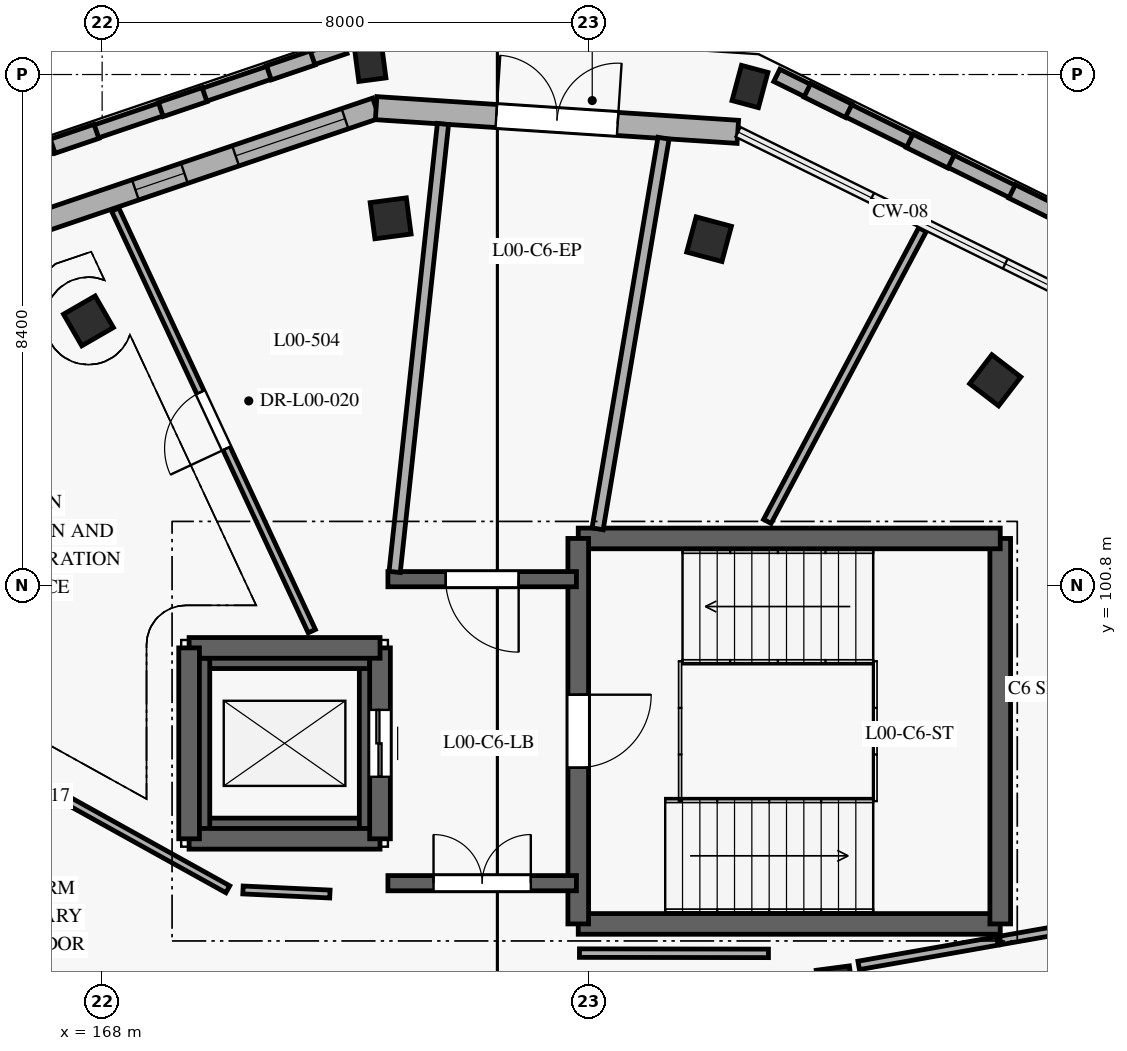
"""IFC4 building model, lengths in metres.
Left out: names, types, materials, properties, quantities, classifications, styles, units other than length and angle.
Written with IfcOpenShell. Run it as: python <this file> out.ifc"""

import sys

from ifc_helpers import new_model, si_unit, direction, frame, frame_2d, origin, origin_2d, place, context, subcontext, project, spatial, rectangle, extrude, element, fill, save


model = new_model("IFC4")
c1 = context("Model", 3, precision=1e-05, world=origin(), true_north=direction((0.0, 1.0)))
c2 = subcontext(c1, "Body", "Model", "MODEL_VIEW")
j1 = project(units=[si_unit("LENGTHUNIT", "METRE"), si_unit("PLANEANGLEUNIT", "RADIAN")], contexts=[c1])
p1 = place(None, origin())
s1 = spatial("IfcSite", under=j1, at=p1, CompositionType="ELEMENT")
p2 = place(p1, origin())
s2 = spatial("IfcBuilding", under=s1, at=p2, CompositionType="ELEMENT")
p3 = place(p2, origin())
s3 = spatial("IfcBuildingStorey", under=s2, at=p3, CompositionType="ELEMENT", Elevation=0.0)
for number, where, z_axis, x_axis in (
    (1, (178.654, 109.003, 0.0), (0.0, 0.0, 1.0), (-0.966, 0.259, 0.0)),
    (2, (172.405, 109.413, 0.0), (0.0, 0.0, 1.0), (-0.991, -0.131, 0.0)),
):
    element("IfcColumn", number, at=place(p3, frame(where, z_axis=z_axis, x_axis=x_axis)), inside=s3, PredefinedType="PILASTER", context=c2, shape_type="SweptSolid", body=[
        extrude(rectangle(XDim=0.45, YDim=0.6, at=origin_2d()), origin(), (0.0, 0.0, 1.0), 4.2),
    ])
for number, where, z_axis, x_axis in (
    (3, (182.688, 104.171, 0.0), (0.0, 0.0, 1.0), (-0.793, 0.609, 0.0)),
    (4, (177.981, 106.492, 0.0), (0.0, 0.0, 1.0), (-0.966, 0.259, 0.0)),
    (5, (172.744, 106.835, 0.0), (0.0, 0.0, 1.0), (-0.991, -0.131, 0.0)),
    (6, (167.775, 105.148, 0.0), (0.0, 0.0, 1.0), (-0.866, -0.5, 0.0)),
):
    element("IfcColumn", number, at=place(p3, frame(where, z_axis=z_axis, x_axis=x_axis)), inside=s3, PredefinedType="COLUMN", context=c2, shape_type="SweptSolid", body=[
        extrude(rectangle(XDim=0.6, YDim=0.6, at=origin_2d()), origin(), (0.0, 0.0, 1.0), 4.2),
    ])
p4 = place(p3, frame((180.052, 94.231, 0.0), z_axis=(0.0, 0.0, 1.0), x_axis=(0.991444861374, 0.13052619222, 0.0)))
e7 = element("IfcColumn", 7, at=p4, inside=s3, PredefinedType="COLUMN", context=c2, shape_type="SweptSolid", body=[
    extrude(rectangle(XDim=0.55, YDim=0.55, at=origin_2d()), origin(), (0.0, 0.0, 1.0), 4.2),
])
p5 = place(p3, frame((166.861, 106.731, 0.0), z_axis=(0.0, 0.0, 1.0), x_axis=(0.94693663561, 0.321420298269, 0.0)))
e8 = element("IfcWall", 8, at=p5, inside=s3, PredefinedType="SOLIDWALL", context=c2, shape_type="SweptSolid", body=[
    extrude(rectangle(XDim=5.961, YDim=0.35, at=frame_2d((2.98, 0.0))), origin(), (0.0, 0.0, 1.0), 3.94),
])
p6 = place(p5, frame((1.781, 0.0, 0.85)))
e9 = element("IfcOpeningElement", 9, at=p6, cuts=e8, PredefinedType="OPENING", context=c2, shape_type="SweptSolid", body=[
    extrude(rectangle(XDim=0.85, YDim=1.4, at=frame_2d((0.425, 0.7))), frame((0.0, 0.185, 0.0), z_axis=(0.0, -1.0, 0.0), x_axis=(1.0, 0.0, 0.0)), (0.0, 0.0, 1.0), 0.37),
])
p7 = place(p5, frame((3.521, 0.0, 0.85)))
e10 = element("IfcOpeningElement", 10, at=p7, cuts=e8, PredefinedType="OPENING", context=c2, shape_type="SweptSolid", body=[
    extrude(rectangle(XDim=1.9, YDim=1.8, at=frame_2d((0.95, 0.9))), frame((0.0, 0.185, 0.0), z_axis=(0.0, -1.0, 0.0), x_axis=(1.0, 0.0, 0.0)), (0.0, 0.0, 1.0), 0.37),
])
p8 = place(p3, frame((172.506, 108.647, 0.0), z_axis=(0.0, 0.0, 1.0), x_axis=(0.997858658418, -0.065407169492, 0.0)))
e11 = element("IfcWall", 11, at=p8, inside=s3, PredefinedType="SOLIDWALL", context=c2, shape_type="SweptSolid", body=[
    extrude(rectangle(XDim=5.961, YDim=0.38, at=frame_2d((2.98, 0.0))), origin(), (0.0, 0.0, 1.0), 3.94),
])
p9 = place(p8, frame((1.98, 0.0, 0.0)))
e12 = element("IfcOpeningElement", 12, at=p9, cuts=e11, PredefinedType="OPENING", context=c2, shape_type="SweptSolid", body=[
    extrude(rectangle(XDim=2.0, YDim=2.2, at=frame_2d((1.0, 1.1))), frame((0.0, 0.2, 0.0), z_axis=(0.0, -1.0, 0.0), x_axis=(1.0, 0.0, 0.0)), (0.0, 0.0, 1.0), 0.4),
])
p10 = place(p3, frame((184.147, 106.695, 0.0), z_axis=(0.0, 0.0, 1.0), x_axis=(-0.896858387366, 0.442317796398, 0.0)))
e13 = element("IfcWall", 13, at=p10, inside=s3, PredefinedType="ELEMENTEDWALL", context=c2, shape_type="SweptSolid", body=[
    extrude(rectangle(XDim=5.633, YDim=0.225, at=frame_2d((2.816, 0.0))), origin(), (0.0, 0.0, 1.0), 0.55),
])
for number, where, z_axis, x_axis in (
    (14, (183.646, 106.942, 0.55), (0.0, 0.0, 1.0), (-0.897, 0.442, 0.0)),
    (15, (181.962, 107.772, 0.55), (0.0, 0.0, 1.0), (-0.897, 0.442, 0.0)),
    (16, (180.278, 108.603, 0.55), (0.0, 0.0, 1.0), (-0.897, 0.442, 0.0)),
):
    element("IfcWall", number, at=place(p3, frame(where, z_axis=z_axis, x_axis=x_axis)), inside=s3, PredefinedType="ELEMENTEDWALL", context=c2, shape_type="SweptSolid", body=[
        extrude(rectangle(XDim=0.76, YDim=0.245, at=frame_2d((0.38, 0.0))), origin(), (0.0, 0.0, 1.0), 3.39),
    ])
p11 = place(p3, frame((171.991, 109.652, 0.0), z_axis=(0.0, 0.0, 1.0), x_axis=(-0.946926405411, -0.321450435893, 0.0)))
e17 = element("IfcWall", 17, at=p11, inside=s3, PredefinedType="ELEMENTEDWALL", context=c2, shape_type="SweptSolid", body=[
    extrude(rectangle(XDim=5.632, YDim=0.225, at=frame_2d((2.816, 0.0))), origin(), (0.0, 0.0, 1.0), 0.55),
])
for number, where, z_axis, x_axis in (
    (18, (171.462, 109.472, 0.55), (0.0, 0.0, 1.0), (-0.947, -0.322, 0.0)),
    (19, (169.684, 108.869, 0.55), (0.0, 0.0, 1.0), (-0.947, -0.321, 0.0)),
):
    element("IfcWall", number, at=place(p3, frame(where, z_axis=z_axis, x_axis=x_axis)), inside=s3, PredefinedType="ELEMENTEDWALL", context=c2, shape_type="SweptSolid", body=[
        extrude(rectangle(XDim=0.76, YDim=0.245, at=frame_2d((0.38, 0.0))), origin(), (0.0, 0.0, 1.0), 3.39),
    ])
p12 = place(p3, frame((167.906, 108.265, 0.55), z_axis=(0.0, 0.0, 1.0), x_axis=(-0.946868666253, -0.321620473335, 0.0)))
e20 = element("IfcWall", 20, at=p12, inside=s3, PredefinedType="ELEMENTEDWALL", context=c2, shape_type="SweptSolid", body=[
    extrude(rectangle(XDim=0.76, YDim=0.245, at=frame_2d((0.38, 0.0))), origin(), (0.0, 0.0, 1.0), 3.39),
])
p13 = place(p3, frame((169.6, 96.8, -1.4), z_axis=(0.0, 0.0, 1.0), x_axis=(1.0, 0.0, 0.0)))
e21 = element("IfcWall", 21, at=p13, inside=s3, PredefinedType="SHEAR", context=c2, shape_type="SweptSolid", body=[
    extrude(rectangle(XDim=2.8, YDim=0.34, at=frame_2d((1.4, 0.0))), origin(), (0.0, 0.0, 1.0), 1.4),
])
p14 = place(p3, frame((172.4, 96.8, -1.4), z_axis=(0.0, 0.0, 1.0), x_axis=(0.0, 1.0, 0.0)))
e22 = element("IfcWall", 22, at=p14, inside=s3, PredefinedType="SHEAR", context=c2, shape_type="SweptSolid", body=[
    extrude(rectangle(XDim=2.8, YDim=0.34, at=frame_2d((1.4, 0.0))), origin(), (0.0, 0.0, 1.0), 1.4),
])
p15 = place(p3, frame((172.4, 99.6, -1.4), z_axis=(0.0, 0.0, 1.0), x_axis=(-1.0, 0.0, 0.0)))
e23 = element("IfcWall", 23, at=p15, inside=s3, PredefinedType="SHEAR", context=c2, shape_type="SweptSolid", body=[
    extrude(rectangle(XDim=2.8, YDim=0.34, at=frame_2d((1.4, 0.0))), origin(), (0.0, 0.0, 1.0), 1.4),
])
p16 = place(p3, frame((169.6, 99.6, -1.4), z_axis=(0.0, 0.0, 1.0), x_axis=(0.0, -1.0, 0.0)))
e24 = element("IfcWall", 24, at=p16, inside=s3, PredefinedType="SHEAR", context=c2, shape_type="SweptSolid", body=[
    extrude(rectangle(XDim=2.8, YDim=0.34, at=frame_2d((1.4, 0.0))), origin(), (0.0, 0.0, 1.0), 1.4),
])
p17 = place(p3, frame((175.83, 95.23, 0.0), z_axis=(0.0, 0.0, 1.0), x_axis=(1.0, 0.0, 0.0)))
e25 = element("IfcWall", 25, at=p17, inside=s3, PredefinedType="SHEAR", context=c2, shape_type="SweptSolid", body=[
    extrude(rectangle(XDim=6.94, YDim=0.34, at=frame_2d((3.47, 0.0))), origin(), (0.0, 0.0, 1.0), 3.95),
])
p18 = place(p3, frame((182.77, 95.23, 0.0), z_axis=(0.0, 0.0, 1.0), x_axis=(0.0, 1.0, 0.0)))
e26 = element("IfcWall", 26, at=p18, inside=s3, PredefinedType="SHEAR", context=c2, shape_type="SweptSolid", body=[
    extrude(rectangle(XDim=6.34, YDim=0.34, at=frame_2d((3.17, 0.0))), origin(), (0.0, 0.0, 1.0), 3.95),
])
p19 = place(p3, frame((182.77, 101.57, 0.0), z_axis=(0.0, 0.0, 1.0), x_axis=(-1.0, 0.0, 0.0)))
e27 = element("IfcWall", 27, at=p19, inside=s3, PredefinedType="SHEAR", context=c2, shape_type="SweptSolid", body=[
    extrude(rectangle(XDim=6.94, YDim=0.34, at=frame_2d((3.47, 0.0))), origin(), (0.0, 0.0, 1.0), 3.95),
])
p20 = place(p3, frame((175.83, 101.57, 0.0), z_axis=(0.0, 0.0, 1.0), x_axis=(0.0, -1.0, 0.0)))
e28 = element("IfcWall", 28, at=p20, inside=s3, PredefinedType="SHEAR", context=c2, shape_type="SweptSolid", body=[
    extrude(rectangle(XDim=6.34, YDim=0.34, at=frame_2d((3.17, 0.0))), origin(), (0.0, 0.0, 1.0), 3.95),
])
p21 = place(p20, frame((2.57, 0.0, 0.0)))
e29 = element("IfcOpeningElement", 29, at=p21, cuts=e28, PredefinedType="OPENING", context=c2, shape_type="SweptSolid", body=[
    extrude(rectangle(XDim=1.2, YDim=2.1, at=frame_2d((0.6, 1.05))), frame((0.0, 0.18, 0.0), z_axis=(0.0, -1.0, 0.0), x_axis=(1.0, 0.0, 0.0)), (0.0, 0.0, 1.0), 0.36),
])
p22 = place(p3, frame((169.43, 96.63, 0.0), z_axis=(0.0, 0.0, 1.0), x_axis=(1.0, 0.0, 0.0)))
e30 = element("IfcWall", 30, at=p22, inside=s3, PredefinedType="SHEAR", context=c2, shape_type="SweptSolid", body=[
    extrude(rectangle(XDim=3.14, YDim=0.34, at=frame_2d((1.57, 0.0))), origin(), (0.0, 0.0, 1.0), 3.95),
])
p23 = place(p3, frame((172.57, 96.63, 0.0), z_axis=(0.0, 0.0, 1.0), x_axis=(0.0, 1.0, 0.0)))
e31 = element("IfcWall", 31, at=p23, inside=s3, PredefinedType="SHEAR", context=c2, shape_type="SweptSolid", body=[
    extrude(rectangle(XDim=3.14, YDim=0.34, at=frame_2d((1.57, 0.0))), origin(), (0.0, 0.0, 1.0), 3.95),
])
p24 = place(p23, frame((1.02, 0.0, 0.0)))
e32 = element("IfcOpeningElement", 32, at=p24, cuts=e31, PredefinedType="OPENING", context=c2, shape_type="SweptSolid", body=[
    extrude(rectangle(XDim=1.1, YDim=2.1, at=frame_2d((0.55, 1.05))), frame((0.0, 0.18, 0.0), z_axis=(0.0, -1.0, 0.0), x_axis=(1.0, 0.0, 0.0)), (0.0, 0.0, 1.0), 0.36),
])
for number, where, z_axis, x_axis in (
    (33, (172.57, 99.77, 0.0), (0.0, 0.0, 1.0), (-1.0, 0.0, 0.0)),
    (34, (169.43, 99.77, 0.0), (0.0, 0.0, 1.0), (0.0, -1.0, 0.0)),
):
    element("IfcWall", number, at=place(p3, frame(where, z_axis=z_axis, x_axis=x_axis)), inside=s3, PredefinedType="SHEAR", context=c2, shape_type="SweptSolid", body=[
        extrude(rectangle(XDim=3.14, YDim=0.34, at=frame_2d((1.57, 0.0))), origin(), (0.0, 0.0, 1.0), 3.95),
    ])
p25 = place(p3, frame((172.7, 95.9, 0.0), z_axis=(0.0, 0.0, 1.0), x_axis=(1.0, 0.0, 0.0)))
e35 = element("IfcWall", 35, at=p25, inside=s3, PredefinedType="SHEAR", context=c2, shape_type="SweptSolid", body=[
    extrude(rectangle(XDim=3.1, YDim=0.25, at=frame_2d((1.55, 0.0))), origin(), (0.0, 0.0, 1.0), 3.95),
])
p26 = place(p25, frame((0.75, 0.0, 0.0)))
e36 = element("IfcOpeningElement", 36, at=p26, cuts=e35, PredefinedType="OPENING", context=c2, shape_type="SweptSolid", body=[
    extrude(rectangle(XDim=1.6, YDim=2.15, at=frame_2d((0.8, 1.075))), frame((0.0, 0.135, 0.0), z_axis=(0.0, -1.0, 0.0), x_axis=(1.0, 0.0, 0.0)), (0.0, 0.0, 1.0), 0.27),
])
p27 = place(p3, frame((175.8, 100.9, 0.0), z_axis=(0.0, 0.0, 1.0), x_axis=(-1.0, 0.0, 0.0)))
e37 = element("IfcWall", 37, at=p27, inside=s3, PredefinedType="SHEAR", context=c2, shape_type="SweptSolid", body=[
    extrude(rectangle(XDim=3.1, YDim=0.25, at=frame_2d((1.55, 0.0))), origin(), (0.0, 0.0, 1.0), 3.95),
])
p28 = place(p27, frame((0.95, 0.0, 0.0)))
e38 = element("IfcOpeningElement", 38, at=p28, cuts=e37, PredefinedType="OPENING", context=c2, shape_type="SweptSolid", body=[
    extrude(rectangle(XDim=1.2, YDim=2.1, at=frame_2d((0.6, 1.05))), frame((0.0, 0.135, 0.0), z_axis=(0.0, -1.0, 0.0), x_axis=(1.0, 0.0, 0.0)), (0.0, 0.0, 1.0), 0.27),
])
p29 = place(p3, frame((176.148, 101.728, 0.0), z_axis=(0.0, 0.0, 1.0), x_axis=(0.166482807525, 0.986044357419, 0.0)))
e39 = element("IfcWall", 39, at=p29, inside=s3, PredefinedType="PARTITIONING", context=c2, shape_type="SweptSolid", body=[
    extrude(rectangle(XDim=6.515, YDim=0.185, at=frame_2d((3.258, 0.0))), origin(), (0.0, 0.0, 1.0), 3.915),
])
p30 = place(p3, frame((173.605, 108.386, 0.0), z_axis=(0.0, 0.0, 1.0), x_axis=(-0.107241554815, -0.994232995289, 0.0)))
e40 = element("IfcWall", 40, at=p30, inside=s3, PredefinedType="PARTITIONING", context=c2, shape_type="SweptSolid", body=[
    extrude(rectangle(XDim=7.41, YDim=0.185, at=frame_2d((3.705, 0.0))), origin(), (0.0, 0.0, 1.0), 3.915),
])
p31 = place(p3, frame((171.448, 100.045, 0.0), z_axis=(0.0, 0.0, 1.0), x_axis=(-0.422616424188, 0.906308643899, 0.0)))
e41 = element("IfcWall", 41, at=p31, inside=s3, PredefinedType="PARTITIONING", context=c2, shape_type="SweptSolid", body=[
    extrude(rectangle(XDim=7.651, YDim=0.13, at=frame_2d((3.825, 0.0))), origin(), (0.0, 0.0, 1.0), 3.915),
])
p32 = place(p31, frame((3.315, 0.0, 0.0)))
e42 = element("IfcOpeningElement", 42, at=p32, cuts=e41, PredefinedType="OPENING", context=c2, shape_type="SweptSolid", body=[
    extrude(rectangle(XDim=1.02, YDim=2.06, at=frame_2d((0.51, 1.03))), frame((0.0, 0.075, 0.0), z_axis=(0.0, -1.0, 0.0), x_axis=(1.0, 0.0, 0.0)), (0.0, 0.0, 1.0), 0.15),
])
p33 = place(p3, frame((162.087, 100.228, 0.0), z_axis=(0.0, 0.0, 1.0), x_axis=(0.874404504476, -0.485197653077, 0.0)))
e43 = element("IfcWall", 43, at=p33, inside=s3, PredefinedType="PARTITIONING", context=c2, shape_type="SweptSolid", body=[
    extrude(rectangle(XDim=9.126, YDim=0.13, at=frame_2d((4.563, 0.0))), origin(), (0.0, 0.0, 1.0), 3.915),
])
p34 = place(p33, frame((4.113, 0.0, 0.0)))
e44 = element("IfcOpeningElement", 44, at=p34, cuts=e43, PredefinedType="OPENING", context=c2, shape_type="SweptSolid", body=[
    extrude(rectangle(XDim=0.9, YDim=2.05, at=frame_2d((0.45, 1.025))), frame((0.0, 0.075, 0.0), z_axis=(0.0, -1.0, 0.0), x_axis=(1.0, 0.0, 0.0)), (0.0, 0.0, 1.0), 0.15),
])
p35 = place(p3, frame((170.316, 95.788, 0.0), z_axis=(0.0, 0.0, 1.0), x_axis=(0.998914369118, -0.046584151481, 0.0)))
e45 = element("IfcWall", 45, at=p35, inside=s3, PredefinedType="PARTITIONING", context=c2, shape_type="SweptSolid", body=[
    extrude(rectangle(XDim=1.431, YDim=0.13, at=frame_2d((0.715, 0.0))), origin(), (0.0, 0.0, 1.0), 3.915),
])
p36 = place(p3, frame((180.442, 94.548, 0.0), z_axis=(0.0, 0.0, 1.0), x_axis=(0.984803709336, 0.173671108934, 0.0)))
e46 = element("IfcWall", 46, at=p36, inside=s3, PredefinedType="PLUMBINGWALL", context=c2, shape_type="SweptSolid", body=[
    extrude(rectangle(XDim=2.317, YDim=0.14, at=frame_2d((1.158, 0.0))), origin(), (0.0, 0.0, 1.0), 3.267),
])
p37 = place(p3, frame((182.77, 94.958, 0.0), z_axis=(0.0, 0.0, 1.0), x_axis=(0.984809373829, 0.173638985308, 0.0)))
e47 = element("IfcWall", 47, at=p37, inside=s3, PredefinedType="PLUMBINGWALL", context=c2, shape_type="SweptSolid", body=[
    extrude(rectangle(XDim=6.662, YDim=0.14, at=frame_2d((3.331, 0.0))), origin(), (0.0, 0.0, 1.0), 3.915),
])
p38 = place(p37, frame((1.975, 0.0, 0.0)))
e48 = element("IfcOpeningElement", 48, at=p38, cuts=e47, PredefinedType="OPENING", context=c2, shape_type="SweptSolid", body=[
    extrude(rectangle(XDim=1.02, YDim=2.06, at=frame_2d((0.51, 1.03))), frame((0.0, 0.08, 0.0), z_axis=(0.0, -1.0, 0.0), x_axis=(1.0, 0.0, 0.0)), (0.0, 0.0, 1.0), 0.16),
])
p39 = place(p3, frame((181.491, 106.648, 0.0), z_axis=(0.0, 0.0, 1.0), x_axis=(-0.46950120322, -0.882931832122, 0.0)))
e49 = element("IfcWall", 49, at=p39, inside=s3, PredefinedType="PLUMBINGWALL", context=c2, shape_type="SweptSolid", body=[
    extrude(rectangle(XDim=5.434, YDim=0.14, at=frame_2d((2.717, 0.0))), origin(), (0.0, 0.0, 1.0), 3.915),
])
p40 = place(p3, frame((175.85, 94.75, 0.0), z_axis=(0.0, 0.0, 1.0), x_axis=(0.999999108177, -0.001335531844, 0.0)))
e50 = element("IfcWall", 50, at=p40, inside=s3, PredefinedType="PLUMBINGWALL", context=c2, shape_type="SweptSolid", body=[
    extrude(rectangle(XDim=3.108, YDim=0.14, at=frame_2d((1.554, 0.0))), origin(), (0.0, 0.0, 1.0), 3.915),
])
p41 = place(p9, origin())
e51 = element("IfcDoor", 51, at=p41, inside=s3, OperationType="DOUBLE_DOOR_SINGLE_SWING", PredefinedType="DOOR", context=c2, shape_type="SweptSolid", body=[
    extrude(rectangle(XDim=2.0, YDim=2.2, at=frame_2d((1.0, 1.1))), frame((0.0, 0.025, 0.0), z_axis=(0.0, -1.0, 0.0), x_axis=(1.0, 0.0, 0.0)), (0.0, 0.0, 1.0), 0.05),
])
fill(e12, e51)
p42 = place(p6, origin())
e52 = element("IfcWindow", 52, at=p42, inside=s3, PartitioningType="SINGLE_PANEL", PredefinedType="WINDOW", context=c2, shape_type="SweptSolid", body=[
    extrude(rectangle(XDim=0.85, YDim=1.4, at=frame_2d((0.425, 0.7))), frame((0.0, 0.03, 0.0), z_axis=(0.0, -1.0, 0.0), x_axis=(1.0, 0.0, 0.0)), (0.0, 0.0, 1.0), 0.06),
])
fill(e9, e52)
p43 = place(p7, origin())
e53 = element("IfcWindow", 53, at=p43, inside=s3, PartitioningType="SINGLE_PANEL", PredefinedType="WINDOW", context=c2, shape_type="SweptSolid", body=[
    extrude(rectangle(XDim=1.9, YDim=1.8, at=frame_2d((0.95, 0.9))), frame((0.0, 0.03, 0.0), z_axis=(0.0, -1.0, 0.0), x_axis=(1.0, 0.0, 0.0)), (0.0, 0.0, 1.0), 0.06),
])
fill(e10, e53)
p44 = place(p21, frame((1.2, 0.0, 0.0), z_axis=(0.0, 0.0, 1.0), x_axis=(-1.0, 0.0, 0.0)))
e54 = element("IfcDoor", 54, at=p44, inside=s3, OperationType="SINGLE_SWING_LEFT", PredefinedType="DOOR", context=c2, shape_type="SweptSolid", body=[
    extrude(rectangle(XDim=1.2, YDim=2.1, at=frame_2d((0.6, 1.05))), frame((0.0, 0.025, 0.0), z_axis=(0.0, -1.0, 0.0), x_axis=(1.0, 0.0, 0.0)), (0.0, 0.0, 1.0), 0.05),
])
fill(e29, e54)
p45 = place(p24, frame((1.1, 0.0, 0.0), z_axis=(0.0, 0.0, 1.0), x_axis=(-1.0, 0.0, 0.0)))
e55 = element("IfcDoor", 55, at=p45, inside=s3, OperationType="DOUBLE_DOOR_SLIDING", PredefinedType="DOOR", context=c2, shape_type="SweptSolid", body=[
    extrude(rectangle(XDim=1.1, YDim=2.1, at=frame_2d((0.55, 1.05))), frame((0.0, 0.025, 0.0), z_axis=(0.0, -1.0, 0.0), x_axis=(1.0, 0.0, 0.0)), (0.0, 0.0, 1.0), 0.05),
])
fill(e32, e55)
p46 = place(p26, frame((1.6, 0.0, 0.0), z_axis=(0.0, 0.0, 1.0), x_axis=(-1.0, 0.0, 0.0)))
e56 = element("IfcDoor", 56, at=p46, inside=s3, OperationType="DOUBLE_DOOR_SINGLE_SWING", PredefinedType="DOOR", context=c2, shape_type="SweptSolid", body=[
    extrude(rectangle(XDim=1.6, YDim=2.15, at=frame_2d((0.8, 1.075))), frame((0.0, 0.025, 0.0), z_axis=(0.0, -1.0, 0.0), x_axis=(1.0, 0.0, 0.0)), (0.0, 0.0, 1.0), 0.05),
])
fill(e36, e56)
p47 = place(p28, frame((1.2, 0.0, 0.0), z_axis=(0.0, 0.0, 1.0), x_axis=(-1.0, 0.0, 0.0)))
e57 = element("IfcDoor", 57, at=p47, inside=s3, OperationType="SINGLE_SWING_LEFT", PredefinedType="DOOR", context=c2, shape_type="SweptSolid", body=[
    extrude(rectangle(XDim=1.2, YDim=2.1, at=frame_2d((0.6, 1.05))), frame((0.0, 0.025, 0.0), z_axis=(0.0, -1.0, 0.0), x_axis=(1.0, 0.0, 0.0)), (0.0, 0.0, 1.0), 0.05),
])
fill(e38, e57)
p48 = place(p32, origin())
e58 = element("IfcDoor", 58, at=p48, inside=s3, OperationType="SINGLE_SWING_LEFT", PredefinedType="DOOR", context=c2, shape_type="SweptSolid", body=[
    extrude(rectangle(XDim=1.02, YDim=2.06, at=frame_2d((0.51, 1.03))), frame((0.0, 0.025, 0.0), z_axis=(0.0, -1.0, 0.0), x_axis=(1.0, 0.0, 0.0)), (0.0, 0.0, 1.0), 0.05),
])
fill(e42, e58)
save(model, sys.argv[1])
